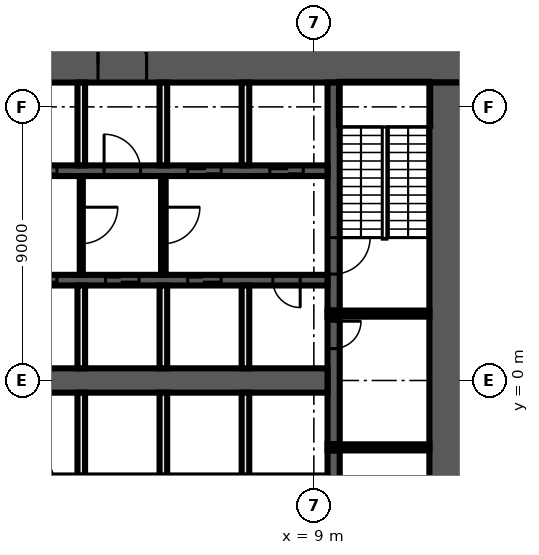
"""IFC4 building model, lengths in metres.
Left out: names, types, materials, properties, quantities, classifications, styles, units other than length and angle.
Written with IfcOpenShell. Run it as: python <this file> out.ifc"""

import sys

from ifc_helpers import new_model, si_unit, direction, frame, frame_2d, origin, place, context, subcontext, project, spatial, rectangle, extrude, element, fill, save


model = new_model("IFC4")
c1 = context("Model", 3, precision=1e-05, world=origin(), true_north=direction((0.0, 1.0)))
c2 = subcontext(c1, "Body", "Model", "MODEL_VIEW")
j1 = project(units=[si_unit("LENGTHUNIT", "METRE"), si_unit("PLANEANGLEUNIT", "RADIAN")], contexts=[c1])
p1 = place(None, origin())
s1 = spatial("IfcSite", under=j1, at=p1, CompositionType="ELEMENT")
p2 = place(p1, origin())
s2 = spatial("IfcBuilding", under=s1, at=p2, CompositionType="ELEMENT")
p3 = place(p2, frame((0.0, 0.0, 33.0)))
s3 = spatial("IfcBuildingStorey", under=s2, at=p3, CompositionType="ELEMENT", Elevation=33.0)
p4 = place(p3, frame((-14.0, 10.4, 0.0), z_axis=(0.0, 0.0, 1.0), x_axis=(1.0, 0.0, 0.0)))
e1 = element("IfcWall", 1, at=p4, inside=s3, PredefinedType="SHEAR", context=c2, shape_type="SweptSolid", body=[
    extrude(rectangle(XDim=28.0, YDim=1.2, at=frame_2d((14.0, 0.0))), origin(), (0.0, 0.0, 1.0), 4.6),
])
p5 = place(p4, frame((15.9, 0.0, 0.0)))
e2 = element("IfcOpeningElement", 2, at=p5, cuts=e1, PredefinedType="OPENING", context=c2, shape_type="SweptSolid", body=[
    extrude(rectangle(XDim=1.6, YDim=2.1, at=frame_2d((0.8, 1.05))), frame((0.0, 0.61, 0.0), z_axis=(0.0, -1.0, 0.0), x_axis=(1.0, 0.0, 0.0)), (0.0, 0.0, 1.0), 1.22),
])
p6 = place(p3, frame((13.4, 9.8, 0.0), z_axis=(0.0, 0.0, 1.0), x_axis=(0.0, -1.0, 0.0)))
e3 = element("IfcWall", 3, at=p6, inside=s3, PredefinedType="SHEAR", context=c2, shape_type="SweptSolid", body=[
    extrude(rectangle(XDim=19.6, YDim=1.2, at=frame_2d((9.8, 0.0))), origin(), (0.0, 0.0, 1.0), 4.6),
])
p7 = place(p3, frame((9.65, -2.3, 0.0), z_axis=(0.0, 0.0, 1.0), x_axis=(0.0, -1.0, 0.0)))
e4 = element("IfcWall", 4, at=p7, inside=s3, PredefinedType="SHEAR", context=c2, shape_type="SweptSolid", body=[
    extrude(rectangle(XDim=7.5, YDim=0.4, at=frame_2d((3.75, 0.0))), origin(), (0.0, 0.0, 1.0), 4.6),
])
p8 = place(p7, frame((1.2, 0.0, 0.0)))
e5 = element("IfcOpeningElement", 5, at=p8, cuts=e4, PredefinedType="OPENING", context=c2, shape_type="SweptSolid", body=[
    extrude(rectangle(XDim=1.2, YDim=2.1, at=frame_2d((0.6, 1.05))), frame((0.0, 0.21, 0.0), z_axis=(0.0, -1.0, 0.0), x_axis=(1.0, 0.0, 0.0)), (0.0, 0.0, 1.0), 0.42),
])
p9 = place(p3, frame((9.65, 2.1, 0.0), z_axis=(0.0, 0.0, 1.0), x_axis=(0.0, -1.0, 0.0)))
e6 = element("IfcWall", 6, at=p9, inside=s3, PredefinedType="SHEAR", context=c2, shape_type="SweptSolid", body=[
    extrude(rectangle(XDim=4.2, YDim=0.4, at=frame_2d((2.1, 0.0))), origin(), (0.0, 0.0, 1.0), 4.6),
])
p10 = place(p9, frame((0.15, 0.0, 0.0)))
e7 = element("IfcOpeningElement", 7, at=p10, cuts=e6, PredefinedType="OPENING", context=c2, shape_type="SweptSolid", body=[
    extrude(rectangle(XDim=0.9, YDim=2.1, at=frame_2d((0.45, 1.05))), frame((0.0, 0.21, 0.0), z_axis=(0.0, -1.0, 0.0), x_axis=(1.0, 0.0, 0.0)), (0.0, 0.0, 1.0), 0.42),
])
p11 = place(p3, frame((9.65, 9.8, 0.0), z_axis=(0.0, 0.0, 1.0), x_axis=(0.0, -1.0, 0.0)))
e8 = element("IfcWall", 8, at=p11, inside=s3, PredefinedType="SHEAR", context=c2, shape_type="SweptSolid", body=[
    extrude(rectangle(XDim=7.5, YDim=0.4, at=frame_2d((3.75, 0.0))), origin(), (0.0, 0.0, 1.0), 4.6),
])
p12 = place(p11, frame((5.1, 0.0, 0.0)))
e9 = element("IfcOpeningElement", 9, at=p12, cuts=e8, PredefinedType="OPENING", context=c2, shape_type="SweptSolid", body=[
    extrude(rectangle(XDim=1.2, YDim=2.1, at=frame_2d((0.6, 1.05))), frame((0.0, 0.21, 0.0), z_axis=(0.0, -1.0, 0.0), x_axis=(1.0, 0.0, 0.0)), (0.0, 0.0, 1.0), 0.42),
])
for number, where, z_axis, x_axis in (
    (10, (9.45, 2.2, 0.0), (0.0, 0.0, 1.0), (1.0, 0.0, 0.0)),
    (11, (9.45, -2.2, 0.0), (0.0, 0.0, 1.0), (1.0, 0.0, 0.0)),
):
    element("IfcWall", number, at=place(p3, frame(where, z_axis=z_axis, x_axis=x_axis)), inside=s3, PredefinedType="SHEAR", context=c2, shape_type="SweptSolid", body=[
        extrude(rectangle(XDim=3.35, YDim=0.2, at=frame_2d((1.675, 0.0))), origin(), (0.0, 0.0, 1.0), 4.6),
    ])
p13 = place(p3, frame((-9.45, 6.9, 0.0), z_axis=(0.0, 0.0, 1.0), x_axis=(1.0, 0.0, 0.0)))
e12 = element("IfcWall", 12, at=p13, inside=s3, PredefinedType="SHEAR", context=c2, shape_type="SweptSolid", body=[
    extrude(rectangle(XDim=18.9, YDim=0.35, at=frame_2d((9.45, 0.0))), origin(), (0.0, 0.0, 1.0), 4.6),
])
p14 = place(p13, frame((0.8, 0.0, 0.0)))
e13 = element("IfcOpeningElement", 13, at=p14, cuts=e12, PredefinedType="OPENING", context=c2, shape_type="SweptSolid", body=[
    extrude(rectangle(XDim=1.1, YDim=2.1, at=frame_2d((0.55, 1.05))), frame((0.0, 0.185, 0.0), z_axis=(0.0, -1.0, 0.0), x_axis=(1.0, 0.0, 0.0)), (0.0, 0.0, 1.0), 0.37),
])
p15 = place(p13, frame((3.5, 0.0, 0.0)))
e14 = element("IfcOpeningElement", 14, at=p15, cuts=e12, PredefinedType="OPENING", context=c2, shape_type="SweptSolid", body=[
    extrude(rectangle(XDim=1.1, YDim=2.1, at=frame_2d((0.55, 1.05))), frame((0.0, 0.185, 0.0), z_axis=(0.0, -1.0, 0.0), x_axis=(1.0, 0.0, 0.0)), (0.0, 0.0, 1.0), 0.37),
])
p16 = place(p13, frame((6.2, 0.0, 0.0)))
e15 = element("IfcOpeningElement", 15, at=p16, cuts=e12, PredefinedType="OPENING", context=c2, shape_type="SweptSolid", body=[
    extrude(rectangle(XDim=1.1, YDim=2.1, at=frame_2d((0.55, 1.05))), frame((0.0, 0.185, 0.0), z_axis=(0.0, -1.0, 0.0), x_axis=(1.0, 0.0, 0.0)), (0.0, 0.0, 1.0), 0.37),
])
p17 = place(p13, frame((8.9, 0.0, 0.0)))
e16 = element("IfcOpeningElement", 16, at=p17, cuts=e12, PredefinedType="OPENING", context=c2, shape_type="SweptSolid", body=[
    extrude(rectangle(XDim=1.1, YDim=2.1, at=frame_2d((0.55, 1.05))), frame((0.0, 0.185, 0.0), z_axis=(0.0, -1.0, 0.0), x_axis=(1.0, 0.0, 0.0)), (0.0, 0.0, 1.0), 0.37),
])
p18 = place(p13, frame((11.55, 0.0, 0.0)))
e17 = element("IfcOpeningElement", 17, at=p18, cuts=e12, PredefinedType="OPENING", context=c2, shape_type="SweptSolid", body=[
    extrude(rectangle(XDim=1.2, YDim=2.1, at=frame_2d((0.6, 1.05))), frame((0.0, 0.185, 0.0), z_axis=(0.0, -1.0, 0.0), x_axis=(1.0, 0.0, 0.0)), (0.0, 0.0, 1.0), 0.37),
])
p19 = place(p13, frame((14.3, 0.0, 0.0)))
e18 = element("IfcOpeningElement", 18, at=p19, cuts=e12, PredefinedType="OPENING", context=c2, shape_type="SweptSolid", body=[
    extrude(rectangle(XDim=1.1, YDim=2.1, at=frame_2d((0.55, 1.05))), frame((0.0, 0.185, 0.0), z_axis=(0.0, -1.0, 0.0), x_axis=(1.0, 0.0, 0.0)), (0.0, 0.0, 1.0), 0.37),
])
p20 = place(p13, frame((17.0, 0.0, 0.0)))
e19 = element("IfcOpeningElement", 19, at=p20, cuts=e12, PredefinedType="OPENING", context=c2, shape_type="SweptSolid", body=[
    extrude(rectangle(XDim=1.1, YDim=2.1, at=frame_2d((0.55, 1.05))), frame((0.0, 0.185, 0.0), z_axis=(0.0, -1.0, 0.0), x_axis=(1.0, 0.0, 0.0)), (0.0, 0.0, 1.0), 0.37),
])
p21 = place(p3, frame((9.45, 3.3, 0.0), z_axis=(0.0, 0.0, 1.0), x_axis=(-1.0, 0.0, 0.0)))
e20 = element("IfcWall", 20, at=p21, inside=s3, PredefinedType="SHEAR", context=c2, shape_type="SweptSolid", body=[
    extrude(rectangle(XDim=18.9, YDim=0.35, at=frame_2d((9.45, 0.0))), origin(), (0.0, 0.0, 1.0), 4.6),
])
p22 = place(p21, frame((17.0, 0.0, 0.0)))
e21 = element("IfcOpeningElement", 21, at=p22, cuts=e20, PredefinedType="OPENING", context=c2, shape_type="SweptSolid", body=[
    extrude(rectangle(XDim=1.1, YDim=2.1, at=frame_2d((0.55, 1.05))), frame((0.0, 0.185, 0.0), z_axis=(0.0, -1.0, 0.0), x_axis=(1.0, 0.0, 0.0)), (0.0, 0.0, 1.0), 0.37),
])
p23 = place(p21, frame((14.3, 0.0, 0.0)))
e22 = element("IfcOpeningElement", 22, at=p23, cuts=e20, PredefinedType="OPENING", context=c2, shape_type="SweptSolid", body=[
    extrude(rectangle(XDim=1.1, YDim=2.1, at=frame_2d((0.55, 1.05))), frame((0.0, 0.185, 0.0), z_axis=(0.0, -1.0, 0.0), x_axis=(1.0, 0.0, 0.0)), (0.0, 0.0, 1.0), 0.37),
])
p24 = place(p21, frame((11.6, 0.0, 0.0)))
e23 = element("IfcOpeningElement", 23, at=p24, cuts=e20, PredefinedType="OPENING", context=c2, shape_type="SweptSolid", body=[
    extrude(rectangle(XDim=1.1, YDim=2.1, at=frame_2d((0.55, 1.05))), frame((0.0, 0.185, 0.0), z_axis=(0.0, -1.0, 0.0), x_axis=(1.0, 0.0, 0.0)), (0.0, 0.0, 1.0), 0.37),
])
p25 = place(p21, frame((8.9, 0.0, 0.0)))
e24 = element("IfcOpeningElement", 24, at=p25, cuts=e20, PredefinedType="OPENING", context=c2, shape_type="SweptSolid", body=[
    extrude(rectangle(XDim=1.1, YDim=2.1, at=frame_2d((0.55, 1.05))), frame((0.0, 0.185, 0.0), z_axis=(0.0, -1.0, 0.0), x_axis=(1.0, 0.0, 0.0)), (0.0, 0.0, 1.0), 0.37),
])
p26 = place(p21, frame((6.2, 0.0, 0.0)))
e25 = element("IfcOpeningElement", 25, at=p26, cuts=e20, PredefinedType="OPENING", context=c2, shape_type="SweptSolid", body=[
    extrude(rectangle(XDim=1.1, YDim=2.1, at=frame_2d((0.55, 1.05))), frame((0.0, 0.185, 0.0), z_axis=(0.0, -1.0, 0.0), x_axis=(1.0, 0.0, 0.0)), (0.0, 0.0, 1.0), 0.37),
])
p27 = place(p21, frame((3.5, 0.0, 0.0)))
e26 = element("IfcOpeningElement", 26, at=p27, cuts=e20, PredefinedType="OPENING", context=c2, shape_type="SweptSolid", body=[
    extrude(rectangle(XDim=1.1, YDim=2.1, at=frame_2d((0.55, 1.05))), frame((0.0, 0.185, 0.0), z_axis=(0.0, -1.0, 0.0), x_axis=(1.0, 0.0, 0.0)), (0.0, 0.0, 1.0), 0.37),
])
p28 = place(p21, frame((0.9, 0.0, 0.0)))
e27 = element("IfcOpeningElement", 27, at=p28, cuts=e20, PredefinedType="OPENING", context=c2, shape_type="SweptSolid", body=[
    extrude(rectangle(XDim=0.9, YDim=2.1, at=frame_2d((0.45, 1.05))), frame((0.0, 0.185, 0.0), z_axis=(0.0, -1.0, 0.0), x_axis=(1.0, 0.0, 0.0)), (0.0, 0.0, 1.0), 0.37),
])
p29 = place(p3, frame((-9.45, 0.0, 0.0), z_axis=(0.0, 0.0, 1.0), x_axis=(1.0, 0.0, 0.0)))
e28 = element("IfcWall", 28, at=p29, inside=s3, PredefinedType="SHEAR", context=c2, shape_type="SweptSolid", body=[
    extrude(rectangle(XDim=18.9, YDim=0.8, at=frame_2d((9.45, 0.0))), origin(), (0.0, 0.0, 1.0), 4.6),
])
for number, where, z_axis, x_axis in (
    (29, (6.75, -3.125, 0.0), (0.0, 0.0, 1.0), (0.0, 1.0, 0.0)),
    (30, (6.75, 0.4, 0.0), (0.0, 0.0, 1.0), (0.0, 1.0, 0.0)),
    (31, (6.75, 7.075, 0.0), (0.0, 0.0, 1.0), (0.0, 1.0, 0.0)),
):
    element("IfcWall", number, at=place(p3, frame(where, z_axis=z_axis, x_axis=x_axis)), inside=s3, PredefinedType="SOLIDWALL", context=c2, shape_type="SweptSolid", body=[
        extrude(rectangle(XDim=2.725, YDim=0.25, at=frame_2d((1.363, 0.0))), origin(), (0.0, 0.0, 1.0), 4.6),
    ])
p30 = place(p3, frame((4.05, 6.725, 0.0), z_axis=(0.0, 0.0, 1.0), x_axis=(0.0, -1.0, 0.0)))
e32 = element("IfcWall", 32, at=p30, inside=s3, PredefinedType="PARTITIONING", context=c2, shape_type="SweptSolid", body=[
    extrude(rectangle(XDim=3.25, YDim=0.15, at=frame_2d((1.625, 0.0))), origin(), (0.0, 0.0, 1.0), 4.6),
])
p31 = place(p30, frame((1.025, 0.0, 0.0)))
e33 = element("IfcOpeningElement", 33, at=p31, cuts=e32, PredefinedType="OPENING", context=c2, shape_type="SweptSolid", body=[
    extrude(rectangle(XDim=1.2, YDim=2.1, at=frame_2d((0.6, 1.05))), frame((0.0, 0.085, 0.0), z_axis=(0.0, -1.0, 0.0), x_axis=(1.0, 0.0, 0.0)), (0.0, 0.0, 1.0), 0.17),
])
for number, where, z_axis, x_axis in (
    (34, (4.05, -3.125, 0.0), (0.0, 0.0, 1.0), (0.0, 1.0, 0.0)),
    (35, (4.05, 0.4, 0.0), (0.0, 0.0, 1.0), (0.0, 1.0, 0.0)),
    (36, (4.05, 7.075, 0.0), (0.0, 0.0, 1.0), (0.0, 1.0, 0.0)),
):
    element("IfcWall", number, at=place(p3, frame(where, z_axis=z_axis, x_axis=x_axis)), inside=s3, PredefinedType="SOLIDWALL", context=c2, shape_type="SweptSolid", body=[
        extrude(rectangle(XDim=2.725, YDim=0.25, at=frame_2d((1.363, 0.0))), origin(), (0.0, 0.0, 1.0), 4.6),
    ])
p32 = place(p3, frame((1.35, 6.725, 0.0), z_axis=(0.0, 0.0, 1.0), x_axis=(0.0, -1.0, 0.0)))
e37 = element("IfcWall", 37, at=p32, inside=s3, PredefinedType="PARTITIONING", context=c2, shape_type="SweptSolid", body=[
    extrude(rectangle(XDim=3.25, YDim=0.1, at=frame_2d((1.625, 0.0))), origin(), (0.0, 0.0, 1.0), 4.6),
])
p33 = place(p32, frame((1.025, 0.0, 0.0)))
e38 = element("IfcOpeningElement", 38, at=p33, cuts=e37, PredefinedType="OPENING", context=c2, shape_type="SweptSolid", body=[
    extrude(rectangle(XDim=1.2, YDim=2.1, at=frame_2d((0.6, 1.05))), frame((0.0, 0.06, 0.0), z_axis=(0.0, -1.0, 0.0), x_axis=(1.0, 0.0, 0.0)), (0.0, 0.0, 1.0), 0.12),
])
for number, where, z_axis, x_axis in (
    (39, (1.35, -3.125, 0.0), (0.0, 0.0, 1.0), (0.0, 1.0, 0.0)),
    (40, (1.35, 0.4, 0.0), (0.0, 0.0, 1.0), (0.0, 1.0, 0.0)),
    (41, (1.35, 7.075, 0.0), (0.0, 0.0, 1.0), (0.0, 1.0, 0.0)),
):
    element("IfcWall", number, at=place(p3, frame(where, z_axis=z_axis, x_axis=x_axis)), inside=s3, PredefinedType="SOLIDWALL", context=c2, shape_type="SweptSolid", body=[
        extrude(rectangle(XDim=2.725, YDim=0.25, at=frame_2d((1.363, 0.0))), origin(), (0.0, 0.0, 1.0), 4.6),
    ])
p34 = place(p10, origin())
e42 = element("IfcDoor", 42, at=p34, inside=s3, OperationType="SINGLE_SWING_RIGHT", PredefinedType="DOOR", context=c2, shape_type="SweptSolid", body=[
    extrude(rectangle(XDim=0.9, YDim=2.1, at=frame_2d((0.45, 1.05))), frame((0.0, 0.025, 0.0), z_axis=(0.0, -1.0, 0.0), x_axis=(1.0, 0.0, 0.0)), (0.0, 0.0, 1.0), 0.05),
])
fill(e7, e42)
p35 = place(p17, origin())
e43 = element("IfcDoor", 43, at=p35, inside=s3, OperationType="DOUBLE_DOOR_SLIDING", PredefinedType="DOOR", context=c2, shape_type="SweptSolid", body=[
    extrude(rectangle(XDim=1.1, YDim=2.1, at=frame_2d((0.55, 1.05))), frame((0.0, 0.025, 0.0), z_axis=(0.0, -1.0, 0.0), x_axis=(1.0, 0.0, 0.0)), (0.0, 0.0, 1.0), 0.05),
])
fill(e16, e43)
p36 = place(p5, origin())
e44 = element("IfcDoor", 44, at=p36, inside=s3, OperationType="DOUBLE_DOOR_SINGLE_SWING", PredefinedType="DOOR", context=c2, shape_type="SweptSolid", body=[
    extrude(rectangle(XDim=1.6, YDim=2.1, at=frame_2d((0.8, 1.05))), frame((0.0, 0.025, 0.0), z_axis=(0.0, -1.0, 0.0), x_axis=(1.0, 0.0, 0.0)), (0.0, 0.0, 1.0), 0.05),
])
fill(e2, e44)
p37 = place(p18, origin())
e45 = element("IfcDoor", 45, at=p37, inside=s3, OperationType="SINGLE_SWING_LEFT", PredefinedType="DOOR", context=c2, shape_type="SweptSolid", body=[
    extrude(rectangle(XDim=1.2, YDim=2.1, at=frame_2d((0.6, 1.05))), frame((0.0, 0.025, 0.0), z_axis=(0.0, -1.0, 0.0), x_axis=(1.0, 0.0, 0.0)), (0.0, 0.0, 1.0), 0.05),
])
fill(e17, e45)
p38 = place(p19, origin())
e46 = element("IfcDoor", 46, at=p38, inside=s3, OperationType="DOUBLE_DOOR_SLIDING", PredefinedType="DOOR", context=c2, shape_type="SweptSolid", body=[
    extrude(rectangle(XDim=1.1, YDim=2.1, at=frame_2d((0.55, 1.05))), frame((0.0, 0.025, 0.0), z_axis=(0.0, -1.0, 0.0), x_axis=(1.0, 0.0, 0.0)), (0.0, 0.0, 1.0), 0.05),
])
fill(e18, e46)
p39 = place(p20, origin())
e47 = element("IfcDoor", 47, at=p39, inside=s3, OperationType="DOUBLE_DOOR_SLIDING", PredefinedType="DOOR", context=c2, shape_type="SweptSolid", body=[
    extrude(rectangle(XDim=1.1, YDim=2.1, at=frame_2d((0.55, 1.05))), frame((0.0, 0.025, 0.0), z_axis=(0.0, -1.0, 0.0), x_axis=(1.0, 0.0, 0.0)), (0.0, 0.0, 1.0), 0.05),
])
fill(e19, e47)
p40 = place(p25, origin())
e48 = element("IfcDoor", 48, at=p40, inside=s3, OperationType="DOUBLE_DOOR_SLIDING", PredefinedType="DOOR", context=c2, shape_type="SweptSolid", body=[
    extrude(rectangle(XDim=1.1, YDim=2.1, at=frame_2d((0.55, 1.05))), frame((0.0, 0.025, 0.0), z_axis=(0.0, -1.0, 0.0), x_axis=(1.0, 0.0, 0.0)), (0.0, 0.0, 1.0), 0.05),
])
fill(e24, e48)
p41 = place(p26, origin())
e49 = element("IfcDoor", 49, at=p41, inside=s3, OperationType="DOUBLE_DOOR_SLIDING", PredefinedType="DOOR", context=c2, shape_type="SweptSolid", body=[
    extrude(rectangle(XDim=1.1, YDim=2.1, at=frame_2d((0.55, 1.05))), frame((0.0, 0.025, 0.0), z_axis=(0.0, -1.0, 0.0), x_axis=(1.0, 0.0, 0.0)), (0.0, 0.0, 1.0), 0.05),
])
fill(e25, e49)
p42 = place(p27, origin())
e50 = element("IfcDoor", 50, at=p42, inside=s3, OperationType="DOUBLE_DOOR_SLIDING", PredefinedType="DOOR", context=c2, shape_type="SweptSolid", body=[
    extrude(rectangle(XDim=1.1, YDim=2.1, at=frame_2d((0.55, 1.05))), frame((0.0, 0.025, 0.0), z_axis=(0.0, -1.0, 0.0), x_axis=(1.0, 0.0, 0.0)), (0.0, 0.0, 1.0), 0.05),
])
fill(e26, e50)
p43 = place(p28, origin())
e51 = element("IfcDoor", 51, at=p43, inside=s3, OperationType="SINGLE_SWING_LEFT", PredefinedType="DOOR", context=c2, shape_type="SweptSolid", body=[
    extrude(rectangle(XDim=0.9, YDim=2.1, at=frame_2d((0.45, 1.05))), frame((0.0, 0.025, 0.0), z_axis=(0.0, -1.0, 0.0), x_axis=(1.0, 0.0, 0.0)), (0.0, 0.0, 1.0), 0.05),
])
fill(e27, e51)
p44 = place(p12, origin())
e52 = element("IfcDoor", 52, at=p44, inside=s3, OperationType="SINGLE_SWING_LEFT", PredefinedType="DOOR", context=c2, shape_type="SweptSolid", body=[
    extrude(rectangle(XDim=1.2, YDim=2.1, at=frame_2d((0.6, 1.05))), frame((0.0, 0.025, 0.0), z_axis=(0.0, -1.0, 0.0), x_axis=(1.0, 0.0, 0.0)), (0.0, 0.0, 1.0), 0.05),
])
fill(e9, e52)
p45 = place(p33, origin())
e53 = element("IfcDoor", 53, at=p45, inside=s3, OperationType="SINGLE_SWING_LEFT", PredefinedType="DOOR", context=c2, shape_type="SweptSolid", body=[
    extrude(rectangle(XDim=1.2, YDim=2.1, at=frame_2d((0.6, 1.05))), frame((0.0, 0.025, 0.0), z_axis=(0.0, -1.0, 0.0), x_axis=(1.0, 0.0, 0.0)), (0.0, 0.0, 1.0), 0.05),
])
fill(e38, e53)
p46 = place(p31, origin())
e54 = element("IfcDoor", 54, at=p46, inside=s3, OperationType="SINGLE_SWING_RIGHT", PredefinedType="DOOR", context=c2, shape_type="SweptSolid", body=[
    extrude(rectangle(XDim=1.2, YDim=2.1, at=frame_2d((0.6, 1.05))), frame((0.0, 0.025, 0.0), z_axis=(0.0, -1.0, 0.0), x_axis=(1.0, 0.0, 0.0)), (0.0, 0.0, 1.0), 0.05),
])
fill(e33, e54)
save(model, sys.argv[1])
